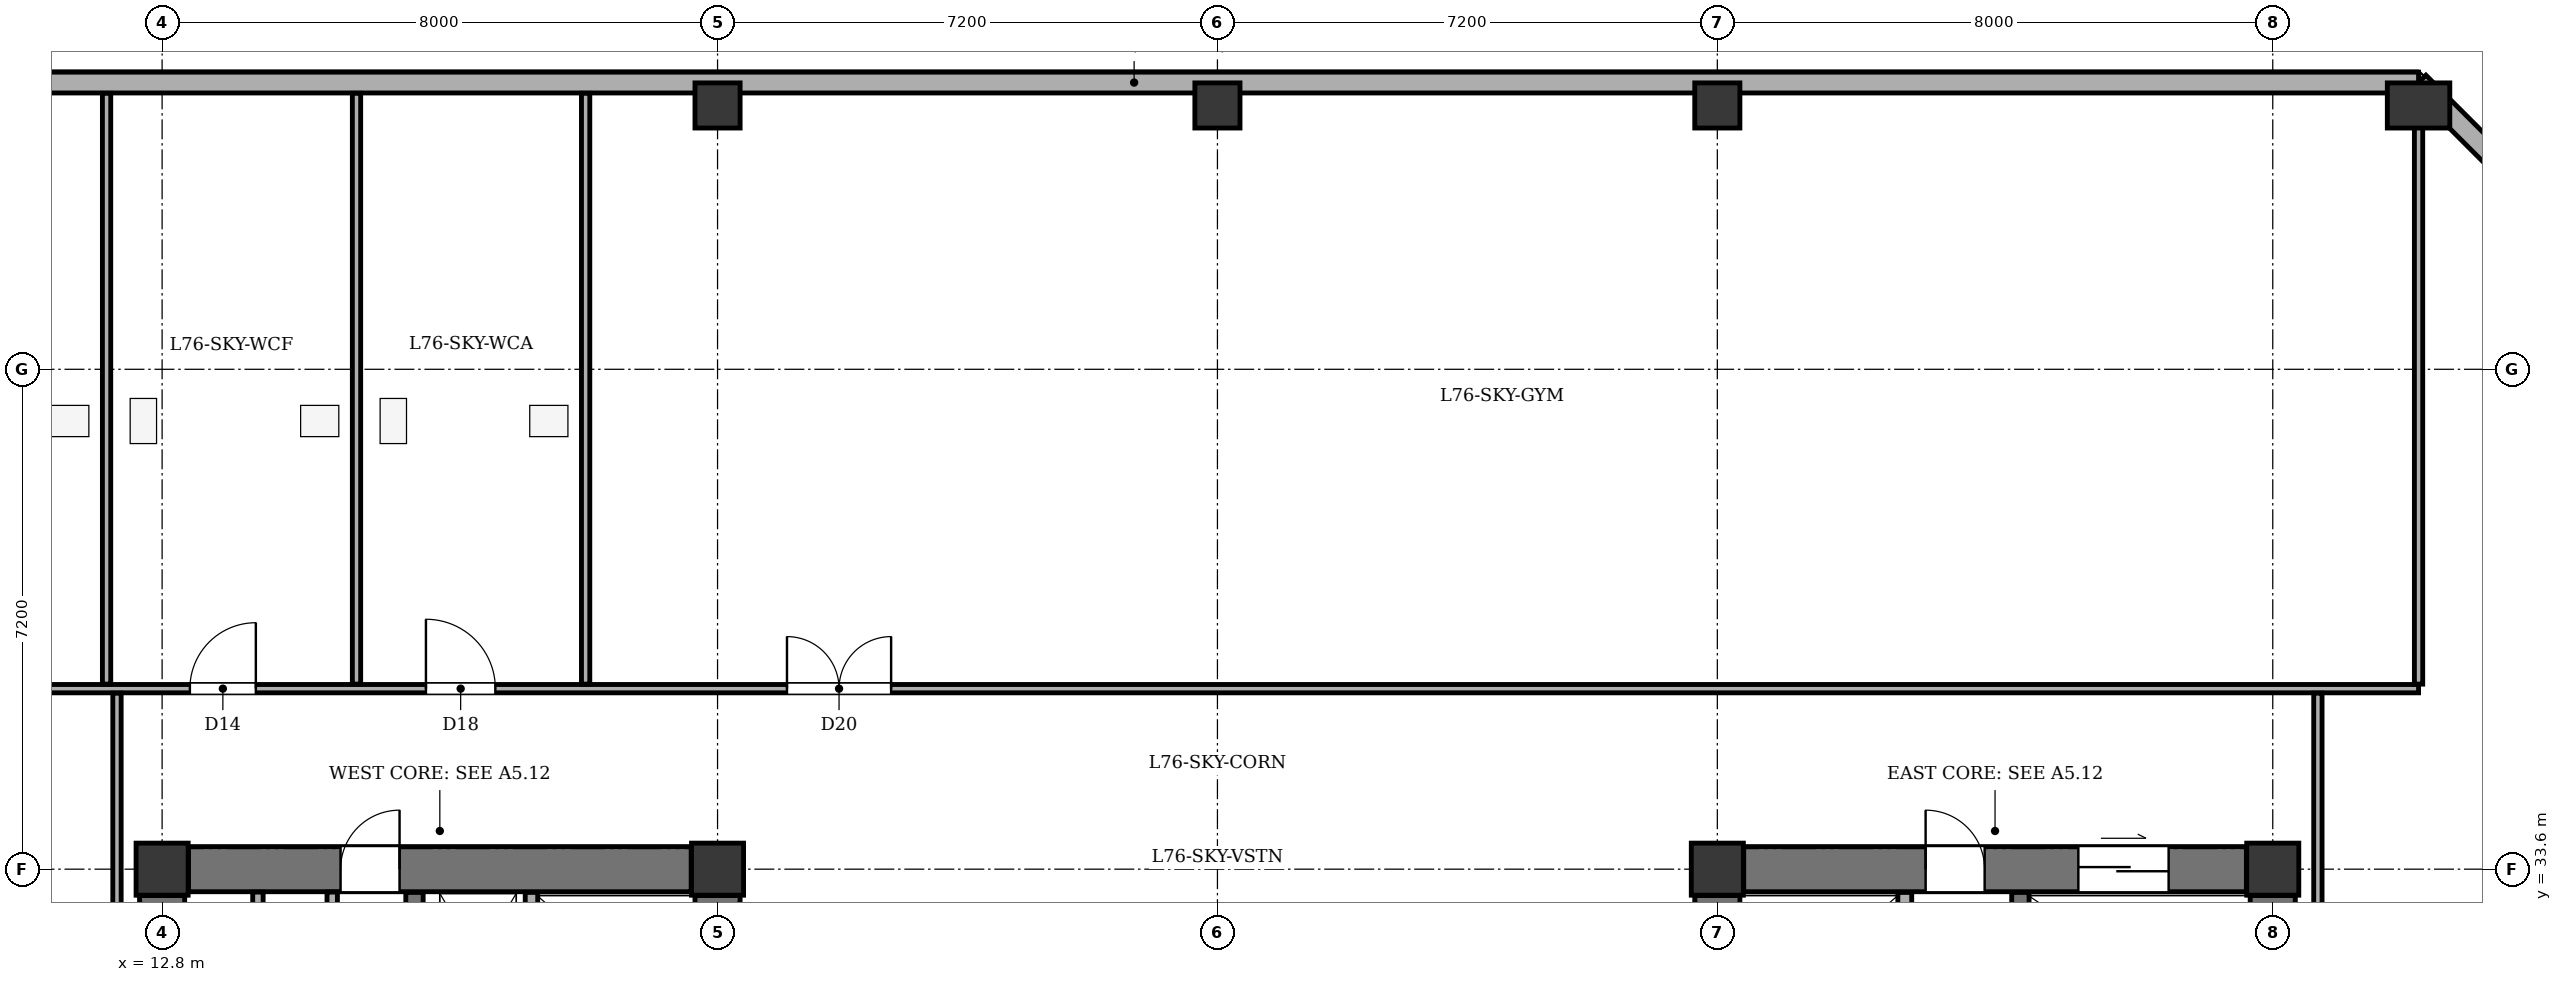
"""IFC4 building model, lengths in metres.
Left out: names, types, materials, properties, quantities, classifications, styles, units other than length and angle.
Written with IfcOpenShell. Run it as: python <this file> out.ifc"""

import sys

from ifc_helpers import new_model, si_unit, direction, frame, frame_2d, origin, origin_2d, place, context, subcontext, project, spatial, rectangle, extrude, element, fill, save


model = new_model("IFC4")
c1 = context("Model", 3, precision=1e-05, world=origin(), true_north=direction((0.0, 1.0)))
c2 = subcontext(c1, "Body", "Model", "MODEL_VIEW")
j1 = project(units=[si_unit("LENGTHUNIT", "METRE"), si_unit("PLANEANGLEUNIT", "RADIAN")], contexts=[c1])
p1 = place(None, origin())
s1 = spatial("IfcSite", under=j1, at=p1, CompositionType="ELEMENT")
p2 = place(p1, origin())
s2 = spatial("IfcBuilding", under=s1, at=p2, CompositionType="ELEMENT")
p3 = place(p2, frame((0.0, 0.0, 287.4)))
s3 = spatial("IfcBuildingStorey", under=s2, at=p3, CompositionType="ELEMENT", Elevation=287.4)
for number, where, z_axis, x_axis in (
    (1, (12.8, 33.6, 0.0), (0.0, 0.0, 1.0), (1.0, 0.0, 0.0)),
    (2, (20.8, 33.6, 0.0), (0.0, 0.0, 1.0), (1.0, 0.0, 0.0)),
    (3, (35.2, 33.6, 0.0), (0.0, 0.0, 1.0), (1.0, 0.0, 0.0)),
    (4, (43.2, 33.6, 0.0), (0.0, 0.0, 1.0), (1.0, 0.0, 0.0)),
):
    element("IfcColumn", number, at=place(p3, frame(where, z_axis=z_axis, x_axis=x_axis)), inside=s3, PredefinedType="COLUMN", context=c2, shape_type="SweptSolid", body=[
        extrude(rectangle(XDim=0.75, YDim=0.75, at=origin_2d()), origin(), (0.0, 0.0, 1.0), 4.8),
    ])
for number, where, z_axis, x_axis in (
    (5, (20.8, 44.6, 0.0), (0.0, 0.0, 1.0), (1.0, 0.0, 0.0)),
    (6, (28.0, 44.6, 0.0), (0.0, 0.0, 1.0), (1.0, 0.0, 0.0)),
    (7, (35.2, 44.6, 0.0), (0.0, 0.0, 1.0), (1.0, 0.0, 0.0)),
):
    element("IfcColumn", number, at=place(p3, frame(where, z_axis=z_axis, x_axis=x_axis)), inside=s3, PredefinedType="COLUMN", context=c2, shape_type="SweptSolid", body=[
        extrude(rectangle(XDim=0.65, YDim=0.65, at=origin_2d()), origin(), (0.0, 0.0, 1.0), 4.8),
    ])
p4 = place(p3, frame((45.3, 44.6, 0.0), z_axis=(0.0, 0.0, 1.0), x_axis=(1.0, 0.0, 0.0)))
e8 = element("IfcColumn", 8, at=p4, inside=s3, PredefinedType="COLUMN", context=c2, shape_type="SweptSolid", body=[
    extrude(rectangle(XDim=0.65, YDim=0.9, at=origin_2d()), origin(), (0.0, 0.0, 1.0), 4.8),
])
p5 = place(p3, frame((8.3, 44.93, 0.0), z_axis=(0.0, 0.0, 1.0), x_axis=(1.0, 0.0, 0.0)))
e9 = element("IfcWall", 9, at=p5, inside=s3, PredefinedType="STANDARD", context=c2, shape_type="SweptSolid", body=[
    extrude(rectangle(XDim=37.0, YDim=0.3, at=frame_2d((18.5, 0.0))), origin(), (0.0, 0.0, 1.0), 3.735),
])
p6 = place(p3, frame((45.3, 44.93, 0.0), z_axis=(0.0, 0.0, 1.0), x_axis=(0.707106781187, -0.707106781187, 0.0)))
e10 = element("IfcWall", 10, at=p6, inside=s3, PredefinedType="STANDARD", context=c2, shape_type="SweptSolid", body=[
    extrude(rectangle(XDim=5.416, YDim=0.3, at=frame_2d((2.708, 0.0))), origin(), (0.0, 0.0, 1.0), 3.735),
])
p7 = place(p3, frame((12.8, 21.18, 0.0), z_axis=(0.0, 0.0, 1.0), x_axis=(0.0, 1.0, 0.0)))
e11 = element("IfcWall", 11, at=p7, inside=s3, PredefinedType="SHEAR", context=c2, shape_type="SweptSolid", body=[
    extrude(rectangle(XDim=12.04, YDim=0.65, at=frame_2d((6.02, 0.0))), origin(), (0.0, 0.0, 1.0), 4.35),
])
p8 = place(p3, frame((13.18, 33.6, 0.0), z_axis=(0.0, 0.0, 1.0), x_axis=(1.0, 0.0, 0.0)))
e12 = element("IfcWall", 12, at=p8, inside=s3, PredefinedType="SHEAR", context=c2, shape_type="SweptSolid", body=[
    extrude(rectangle(XDim=7.24, YDim=0.65, at=frame_2d((3.62, 0.0))), origin(), (0.0, 0.0, 1.0), 4.35),
])
p9 = place(p8, frame((2.19, 0.0, 0.0)))
e13 = element("IfcOpeningElement", 13, at=p9, cuts=e12, PredefinedType="OPENING", context=c2, shape_type="SweptSolid", body=[
    extrude(rectangle(XDim=0.85, YDim=2.02, at=frame_2d((0.425, 1.01))), frame((0.0, 0.335, 0.0), z_axis=(0.0, -1.0, 0.0), x_axis=(1.0, 0.0, 0.0)), (0.0, 0.0, 1.0), 0.67),
])
p10 = place(p3, frame((20.8, 31.1, 0.0), z_axis=(0.0, 0.0, 1.0), x_axis=(0.0, 1.0, 0.0)))
e14 = element("IfcWall", 14, at=p10, inside=s3, PredefinedType="SHEAR", context=c2, shape_type="SweptSolid", body=[
    extrude(rectangle(XDim=2.12, YDim=0.65, at=frame_2d((1.06, 0.0))), origin(), (0.0, 0.0, 1.0), 4.35),
])
p11 = place(p10, frame((0.4, 0.0, 0.0)))
e15 = element("IfcOpeningElement", 15, at=p11, cuts=e14, PredefinedType="OPENING", context=c2, shape_type="SweptSolid", body=[
    extrude(rectangle(XDim=1.1, YDim=2.1, at=frame_2d((0.55, 1.05))), frame((0.0, 0.335, 0.0), z_axis=(0.0, -1.0, 0.0), x_axis=(1.0, 0.0, 0.0)), (0.0, 0.0, 1.0), 0.67),
])
p12 = place(p3, frame((16.435, 21.135, 0.0), z_axis=(0.0, 0.0, 1.0), x_axis=(0.0, 1.0, 0.0)))
e16 = element("IfcWall", 16, at=p12, inside=s3, PredefinedType="SHEAR", context=c2, shape_type="SweptSolid", body=[
    extrude(rectangle(XDim=12.13, YDim=0.25, at=frame_2d((6.065, 0.0))), origin(), (0.0, 0.0, 1.0), 4.35),
])
p13 = place(p12, frame((0.515, 0.0, 0.0)))
e17 = element("IfcOpeningElement", 17, at=p13, cuts=e16, PredefinedType="OPENING", context=c2, shape_type="SweptSolid", body=[
    extrude(rectangle(XDim=1.2, YDim=2.15, at=frame_2d((0.6, 1.075))), frame((0.0, 0.135, 0.0), z_axis=(0.0, -1.0, 0.0), x_axis=(1.0, 0.0, 0.0)), (0.0, 0.0, 1.0), 0.27),
])
p14 = place(p12, frame((2.665, 0.0, 0.0)))
e18 = element("IfcOpeningElement", 18, at=p14, cuts=e16, PredefinedType="OPENING", context=c2, shape_type="SweptSolid", body=[
    extrude(rectangle(XDim=1.15, YDim=2.15, at=frame_2d((0.575, 1.075))), frame((0.0, 0.135, 0.0), z_axis=(0.0, -1.0, 0.0), x_axis=(1.0, 0.0, 0.0)), (0.0, 0.0, 1.0), 0.27),
])
p15 = place(p3, frame((18.12, 31.17, 0.0), z_axis=(0.0, 0.0, 1.0), x_axis=(0.0, 1.0, 0.0)))
e19 = element("IfcWall", 19, at=p15, inside=s3, PredefinedType="PARTITIONING", context=c2, shape_type="SweptSolid", body=[
    extrude(rectangle(XDim=2.095, YDim=0.18, at=frame_2d((1.047, 0.0))), origin(), (0.0, 0.0, 1.0), 4.35),
])
p16 = place(p3, frame((43.2, 21.18, 0.0), z_axis=(0.0, 0.0, 1.0), x_axis=(0.0, 1.0, 0.0)))
e20 = element("IfcWall", 20, at=p16, inside=s3, PredefinedType="SHEAR", context=c2, shape_type="SweptSolid", body=[
    extrude(rectangle(XDim=12.04, YDim=0.65, at=frame_2d((6.02, 0.0))), origin(), (0.0, 0.0, 1.0), 4.35),
])
p17 = place(p3, frame((35.58, 33.6, 0.0), z_axis=(0.0, 0.0, 1.0), x_axis=(1.0, 0.0, 0.0)))
e21 = element("IfcWall", 21, at=p17, inside=s3, PredefinedType="SHEAR", context=c2, shape_type="SweptSolid", body=[
    extrude(rectangle(XDim=7.24, YDim=0.65, at=frame_2d((3.62, 0.0))), origin(), (0.0, 0.0, 1.0), 4.35),
])
p18 = place(p17, frame((4.82, 0.0, 0.0)))
e22 = element("IfcOpeningElement", 22, at=p18, cuts=e21, PredefinedType="OPENING", context=c2, shape_type="SweptSolid", body=[
    extrude(rectangle(XDim=1.3, YDim=2.15, at=frame_2d((0.65, 1.075))), frame((0.0, 0.335, 0.0), z_axis=(0.0, -1.0, 0.0), x_axis=(1.0, 0.0, 0.0)), (0.0, 0.0, 1.0), 0.67),
])
p19 = place(p17, frame((2.62, 0.0, 0.0)))
e23 = element("IfcOpeningElement", 23, at=p19, cuts=e21, PredefinedType="OPENING", context=c2, shape_type="SweptSolid", body=[
    extrude(rectangle(XDim=0.85, YDim=2.02, at=frame_2d((0.425, 1.01))), frame((0.0, 0.335, 0.0), z_axis=(0.0, -1.0, 0.0), x_axis=(1.0, 0.0, 0.0)), (0.0, 0.0, 1.0), 0.67),
])
p20 = place(p3, frame((35.2, 31.1, 0.0), z_axis=(0.0, 0.0, 1.0), x_axis=(0.0, 1.0, 0.0)))
e24 = element("IfcWall", 24, at=p20, inside=s3, PredefinedType="SHEAR", context=c2, shape_type="SweptSolid", body=[
    extrude(rectangle(XDim=2.12, YDim=0.65, at=frame_2d((1.06, 0.0))), origin(), (0.0, 0.0, 1.0), 4.35),
])
p21 = place(p20, frame((0.4, 0.0, 0.0)))
e25 = element("IfcOpeningElement", 25, at=p21, cuts=e24, PredefinedType="OPENING", context=c2, shape_type="SweptSolid", body=[
    extrude(rectangle(XDim=1.1, YDim=2.1, at=frame_2d((0.55, 1.05))), frame((0.0, 0.335, 0.0), z_axis=(0.0, -1.0, 0.0), x_axis=(1.0, 0.0, 0.0)), (0.0, 0.0, 1.0), 0.67),
])
p22 = place(p3, frame((39.565, 21.135, 0.0), z_axis=(0.0, 0.0, 1.0), x_axis=(0.0, 1.0, 0.0)))
e26 = element("IfcWall", 26, at=p22, inside=s3, PredefinedType="SHEAR", context=c2, shape_type="SweptSolid", body=[
    extrude(rectangle(XDim=12.13, YDim=0.25, at=frame_2d((6.065, 0.0))), origin(), (0.0, 0.0, 1.0), 4.35),
])
p23 = place(p22, frame((0.515, 0.0, 0.0)))
e27 = element("IfcOpeningElement", 27, at=p23, cuts=e26, PredefinedType="OPENING", context=c2, shape_type="SweptSolid", body=[
    extrude(rectangle(XDim=1.2, YDim=2.15, at=frame_2d((0.6, 1.075))), frame((0.0, 0.135, 0.0), z_axis=(0.0, -1.0, 0.0), x_axis=(1.0, 0.0, 0.0)), (0.0, 0.0, 1.0), 0.27),
])
p24 = place(p22, frame((2.665, 0.0, 0.0)))
e28 = element("IfcOpeningElement", 28, at=p24, cuts=e26, PredefinedType="OPENING", context=c2, shape_type="SweptSolid", body=[
    extrude(rectangle(XDim=1.15, YDim=2.15, at=frame_2d((0.575, 1.075))), frame((0.0, 0.135, 0.0), z_axis=(0.0, -1.0, 0.0), x_axis=(1.0, 0.0, 0.0)), (0.0, 0.0, 1.0), 0.27),
])
p25 = place(p3, frame((37.9, 25.27, 0.0), z_axis=(0.0, 0.0, 1.0), x_axis=(0.0, 1.0, 0.0)))
e29 = element("IfcWall", 29, at=p25, inside=s3, PredefinedType="SOLIDWALL", context=c2, shape_type="SweptSolid", body=[
    extrude(rectangle(XDim=7.995, YDim=0.2, at=frame_2d((3.998, 0.0))), origin(), (0.0, 0.0, 1.0), 4.35),
])
p26 = place(p3, frame((14.18, 30.96, 0.0), z_axis=(0.0, 0.0, 1.0), x_axis=(0.0, 1.0, 0.0)))
e30 = element("IfcWall", 30, at=p26, inside=s3, PredefinedType="PARTITIONING", context=c2, shape_type="SweptSolid", body=[
    extrude(rectangle(XDim=2.31, YDim=0.15, at=frame_2d((1.155, 0.0))), origin(), (0.0, 0.0, 1.0), 4.35),
])
p27 = place(p26, frame((0.47, 0.0, 0.0)))
e31 = element("IfcOpeningElement", 31, at=p27, cuts=e30, PredefinedType="OPENING", context=c2, shape_type="SweptSolid", body=[
    extrude(rectangle(XDim=0.85, YDim=2.02, at=frame_2d((0.425, 1.01))), frame((0.0, 0.085, 0.0), z_axis=(0.0, -1.0, 0.0), x_axis=(1.0, 0.0, 0.0)), (0.0, 0.0, 1.0), 0.17),
])
p28 = place(p3, frame((15.25, 30.96, 0.0), z_axis=(0.0, 0.0, 1.0), x_axis=(0.0, 1.0, 0.0)))
e32 = element("IfcWall", 32, at=p28, inside=s3, PredefinedType="PARTITIONING", context=c2, shape_type="SweptSolid", body=[
    extrude(rectangle(XDim=2.31, YDim=0.15, at=frame_2d((1.155, 0.0))), origin(), (0.0, 0.0, 1.0), 4.35),
])
p29 = place(p28, frame((0.47, 0.0, 0.0)))
e33 = element("IfcOpeningElement", 33, at=p29, cuts=e32, PredefinedType="OPENING", context=c2, shape_type="SweptSolid", body=[
    extrude(rectangle(XDim=0.85, YDim=2.02, at=frame_2d((0.425, 1.01))), frame((0.0, 0.085, 0.0), z_axis=(0.0, -1.0, 0.0), x_axis=(1.0, 0.0, 0.0)), (0.0, 0.0, 1.0), 0.17),
])
p30 = place(p3, frame((8.3, 36.2, 0.0), z_axis=(0.0, 0.0, 1.0), x_axis=(1.0, 0.0, 0.0)))
e34 = element("IfcWall", 34, at=p30, inside=s3, PredefinedType="PARTITIONING", context=c2, shape_type="SweptSolid", body=[
    extrude(rectangle(XDim=37.0, YDim=0.12, at=frame_2d((18.5, 0.0))), origin(), (0.0, 0.0, 1.0), 4.35),
])
p31 = place(p30, frame((1.3, 0.0, 0.0)))
e35 = element("IfcOpeningElement", 35, at=p31, cuts=e34, PredefinedType="OPENING", context=c2, shape_type="SweptSolid", body=[
    extrude(rectangle(XDim=0.95, YDim=2.1, at=frame_2d((0.475, 1.05))), frame((0.0, 0.07, 0.0), z_axis=(0.0, -1.0, 0.0), x_axis=(1.0, 0.0, 0.0)), (0.0, 0.0, 1.0), 0.14),
])
p32 = place(p30, frame((4.9, 0.0, 0.0)))
e36 = element("IfcOpeningElement", 36, at=p32, cuts=e34, PredefinedType="OPENING", context=c2, shape_type="SweptSolid", body=[
    extrude(rectangle(XDim=0.95, YDim=2.1, at=frame_2d((0.475, 1.05))), frame((0.0, 0.07, 0.0), z_axis=(0.0, -1.0, 0.0), x_axis=(1.0, 0.0, 0.0)), (0.0, 0.0, 1.0), 0.14),
])
p33 = place(p30, frame((8.3, 0.0, 0.0)))
e37 = element("IfcOpeningElement", 37, at=p33, cuts=e34, PredefinedType="OPENING", context=c2, shape_type="SweptSolid", body=[
    extrude(rectangle(XDim=1.0, YDim=2.1, at=frame_2d((0.5, 1.05))), frame((0.0, 0.07, 0.0), z_axis=(0.0, -1.0, 0.0), x_axis=(1.0, 0.0, 0.0)), (0.0, 0.0, 1.0), 0.14),
])
p34 = place(p30, frame((13.5, 0.0, 0.0)))
e38 = element("IfcOpeningElement", 38, at=p34, cuts=e34, PredefinedType="OPENING", context=c2, shape_type="SweptSolid", body=[
    extrude(rectangle(XDim=1.5, YDim=2.15, at=frame_2d((0.75, 1.075))), frame((0.0, 0.07, 0.0), z_axis=(0.0, -1.0, 0.0), x_axis=(1.0, 0.0, 0.0)), (0.0, 0.0, 1.0), 0.14),
])
for number, where, z_axis, x_axis in (
    (39, (12.0, 36.265, 0.0), (0.0, 0.0, 1.0), (0.0, 1.0, 0.0)),
    (40, (15.6, 36.265, 0.0), (0.0, 0.0, 1.0), (0.0, 1.0, 0.0)),
    (41, (18.9, 36.265, 0.0), (0.0, 0.0, 1.0), (0.0, 1.0, 0.0)),
    (42, (45.3, 36.265, 0.0), (0.0, 0.0, 1.0), (0.0, 1.0, 0.0)),
):
    element("IfcWall", number, at=place(p3, frame(where, z_axis=z_axis, x_axis=x_axis)), inside=s3, PredefinedType="PARTITIONING", context=c2, shape_type="SweptSolid", body=[
        extrude(rectangle(XDim=8.51, YDim=0.12, at=frame_2d((4.255, 0.0))), origin(), (0.0, 0.0, 1.0), 4.35),
    ])
p35 = place(p3, frame((12.15, 18.665, 0.0), z_axis=(0.0, 0.0, 1.0), x_axis=(0.0, 1.0, 0.0)))
e43 = element("IfcWall", 43, at=p35, inside=s3, PredefinedType="PARTITIONING", context=c2, shape_type="SweptSolid", body=[
    extrude(rectangle(XDim=17.47, YDim=0.12, at=frame_2d((8.735, 0.0))), origin(), (0.0, 0.0, 1.0), 4.35),
])
p36 = place(p35, frame((0.385, 0.0, 0.0)))
e44 = element("IfcOpeningElement", 44, at=p36, cuts=e43, PredefinedType="OPENING", context=c2, shape_type="SweptSolid", body=[
    extrude(rectangle(XDim=1.1, YDim=2.15, at=frame_2d((0.55, 1.075))), frame((0.0, 0.07, 0.0), z_axis=(0.0, -1.0, 0.0), x_axis=(1.0, 0.0, 0.0)), (0.0, 0.0, 1.0), 0.14),
])
p37 = place(p3, frame((43.85, 18.665, 0.0), z_axis=(0.0, 0.0, 1.0), x_axis=(0.0, 1.0, 0.0)))
e45 = element("IfcWall", 45, at=p37, inside=s3, PredefinedType="PARTITIONING", context=c2, shape_type="SweptSolid", body=[
    extrude(rectangle(XDim=17.47, YDim=0.12, at=frame_2d((8.735, 0.0))), origin(), (0.0, 0.0, 1.0), 4.35),
])
p38 = place(p37, frame((0.385, 0.0, 0.0)))
e46 = element("IfcOpeningElement", 46, at=p38, cuts=e45, PredefinedType="OPENING", context=c2, shape_type="SweptSolid", body=[
    extrude(rectangle(XDim=1.1, YDim=2.15, at=frame_2d((0.55, 1.075))), frame((0.0, 0.07, 0.0), z_axis=(0.0, -1.0, 0.0), x_axis=(1.0, 0.0, 0.0)), (0.0, 0.0, 1.0), 0.14),
])
p39 = place(p9, origin())
e47 = element("IfcDoor", 47, at=p39, inside=s3, OperationType="SINGLE_SWING_RIGHT", PredefinedType="DOOR", context=c2, shape_type="SweptSolid", body=[
    extrude(rectangle(XDim=0.85, YDim=2.02, at=frame_2d((0.425, 1.01))), frame((0.0, 0.025, 0.0), z_axis=(0.0, -1.0, 0.0), x_axis=(1.0, 0.0, 0.0)), (0.0, 0.0, 1.0), 0.05),
])
fill(e13, e47)
p40 = place(p18, origin())
e48 = element("IfcDoor", 48, at=p40, inside=s3, OperationType="DOUBLE_DOOR_SLIDING", PredefinedType="DOOR", context=c2, shape_type="SweptSolid", body=[
    extrude(rectangle(XDim=1.3, YDim=2.15, at=frame_2d((0.65, 1.075))), frame((0.0, 0.025, 0.0), z_axis=(0.0, -1.0, 0.0), x_axis=(1.0, 0.0, 0.0)), (0.0, 0.0, 1.0), 0.05),
])
fill(e22, e48)
p41 = place(p19, origin())
e49 = element("IfcDoor", 49, at=p41, inside=s3, OperationType="SINGLE_SWING_LEFT", PredefinedType="DOOR", context=c2, shape_type="SweptSolid", body=[
    extrude(rectangle(XDim=0.85, YDim=2.02, at=frame_2d((0.425, 1.01))), frame((0.0, 0.025, 0.0), z_axis=(0.0, -1.0, 0.0), x_axis=(1.0, 0.0, 0.0)), (0.0, 0.0, 1.0), 0.05),
])
fill(e23, e49)
p42 = place(p32, origin())
e50 = element("IfcDoor", 50, at=p42, inside=s3, OperationType="SINGLE_SWING_RIGHT", PredefinedType="DOOR", context=c2, shape_type="SweptSolid", body=[
    extrude(rectangle(XDim=0.95, YDim=2.1, at=frame_2d((0.475, 1.05))), frame((0.0, 0.025, 0.0), z_axis=(0.0, -1.0, 0.0), x_axis=(1.0, 0.0, 0.0)), (0.0, 0.0, 1.0), 0.05),
])
fill(e36, e50)
p43 = place(p33, origin())
e51 = element("IfcDoor", 51, at=p43, inside=s3, OperationType="SINGLE_SWING_LEFT", PredefinedType="DOOR", context=c2, shape_type="SweptSolid", body=[
    extrude(rectangle(XDim=1.0, YDim=2.1, at=frame_2d((0.5, 1.05))), frame((0.0, 0.025, 0.0), z_axis=(0.0, -1.0, 0.0), x_axis=(1.0, 0.0, 0.0)), (0.0, 0.0, 1.0), 0.05),
])
fill(e37, e51)
p44 = place(p34, origin())
e52 = element("IfcDoor", 52, at=p44, inside=s3, OperationType="DOUBLE_DOOR_SINGLE_SWING", PredefinedType="DOOR", context=c2, shape_type="SweptSolid", body=[
    extrude(rectangle(XDim=1.5, YDim=2.15, at=frame_2d((0.75, 1.075))), frame((0.0, 0.025, 0.0), z_axis=(0.0, -1.0, 0.0), x_axis=(1.0, 0.0, 0.0)), (0.0, 0.0, 1.0), 0.05),
])
fill(e38, e52)
save(model, sys.argv[1])
